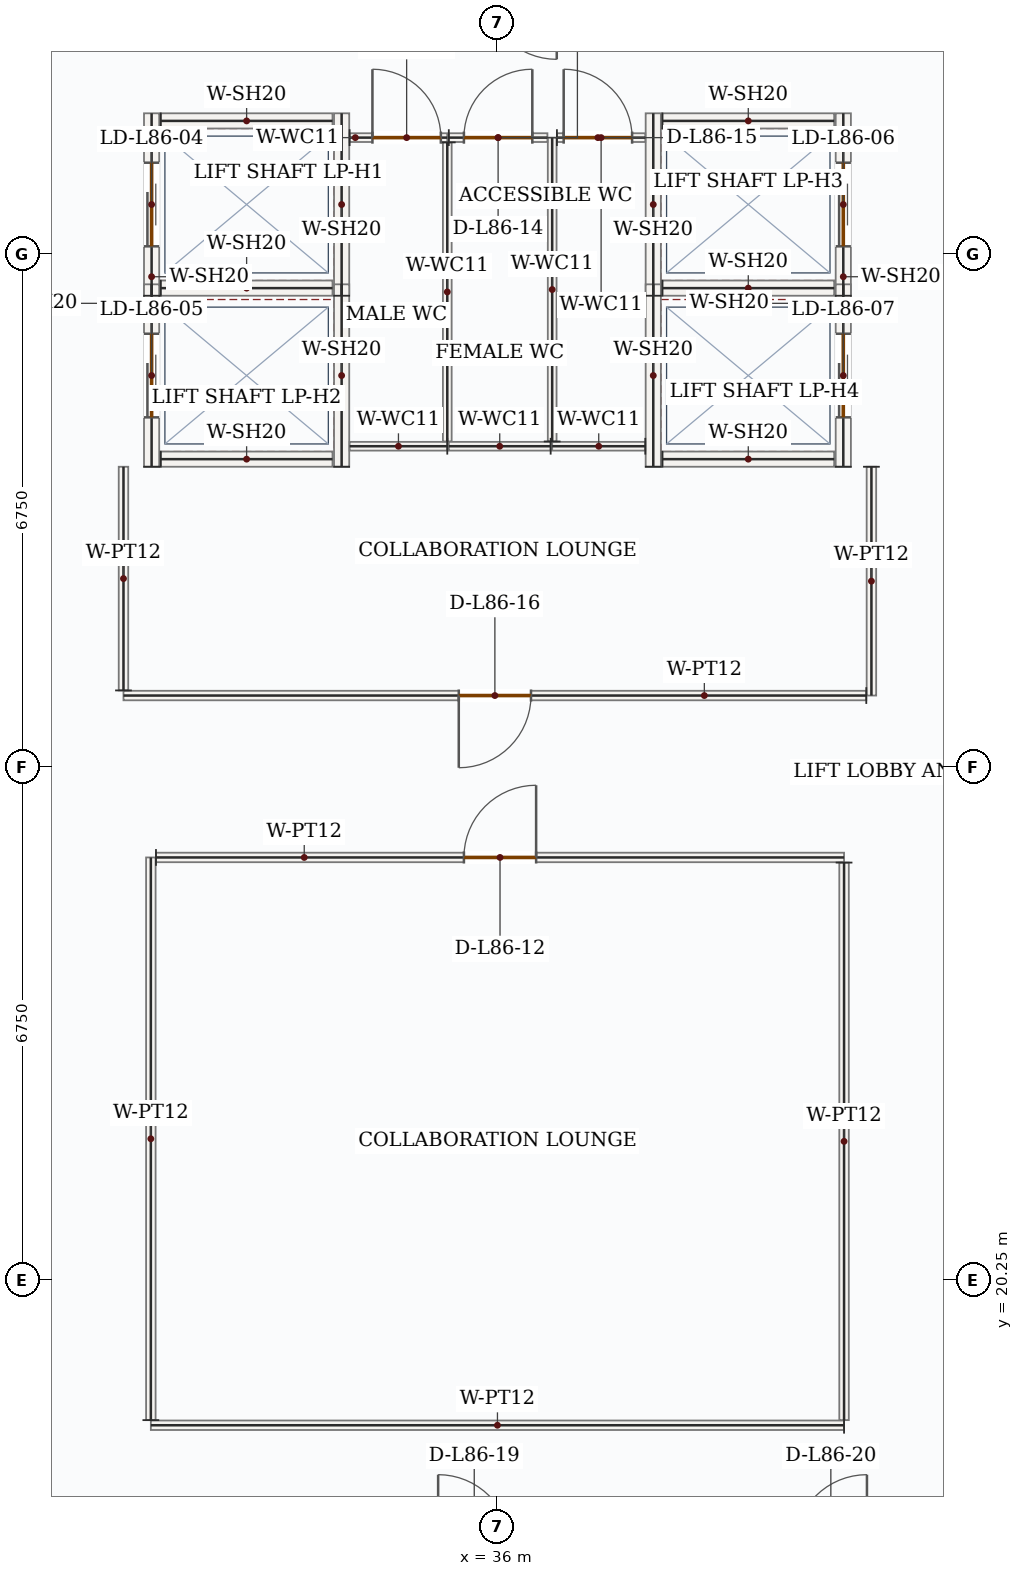
"""IFC4 building model, lengths in metres.
Left out: names, types, materials, properties, quantities, classifications, styles, units other than length and angle.
Written with IfcOpenShell. Run it as: python <this file> out.ifc"""

import sys

from ifc_helpers import new_model, si_unit, direction, frame, frame_2d, origin, place, context, subcontext, project, spatial, rectangle, extrude, source, transform, mapped, element, fill, save


model = new_model("IFC4")
c1 = context("Model", 3, precision=1e-05, world=origin(), true_north=direction((0.0, 1.0)))
c2 = subcontext(c1, "Body", "Model", "MODEL_VIEW")
j1 = project(units=[si_unit("LENGTHUNIT", "METRE"), si_unit("PLANEANGLEUNIT", "RADIAN")], contexts=[c1])
p1 = place(None, origin())
s1 = spatial("IfcSite", under=j1, at=p1, CompositionType="ELEMENT")
p2 = place(p1, origin())
s2 = spatial("IfcBuilding", under=s1, at=p2, CompositionType="ELEMENT")
p3 = place(p2, frame((0.0, 0.0, 353.55)))
s3 = spatial("IfcBuildingStorey", under=s2, at=p3, CompositionType="ELEMENT", Elevation=353.55)
p4 = place(p3, frame((31.45, 33.2, 0.0), z_axis=(0.0, 0.0, 1.0), x_axis=(0.0, 1.0, 0.0)))
e1 = element("IfcWall", 1, at=p4, inside=s3, PredefinedType="SOLIDWALL", context=c2, shape_type="SweptSolid", body=[
    extrude(rectangle(XDim=2.4, YDim=0.2, at=frame_2d((1.2, 0.0))), origin(), (0.0, 0.0, 1.0), 3.5),
])
p5 = place(p4, frame((0.65, 0.0, 0.0)))
e2 = element("IfcOpeningElement", 2, at=p5, cuts=e1, PredefinedType="OPENING", context=c2, shape_type="SweptSolid", body=[
    extrude(rectangle(XDim=1.1, YDim=2.15, at=frame_2d((0.55, 1.075))), frame((0.0, 0.11, 0.0), z_axis=(0.0, -1.0, 0.0), x_axis=(1.0, 0.0, 0.0)), (0.0, 0.0, 1.0), 0.22),
])
m1 = source(origin(), c2, "Body", "SweptSolid", [
    extrude(rectangle(XDim=2.4, YDim=0.2, at=frame_2d((1.2, 0.0))), origin(), (0.0, 0.0, 1.0), 3.5),
])
p6 = place(p3, frame((33.95, 33.2, 0.0), z_axis=(0.0, 0.0, 1.0), x_axis=(0.0, 1.0, 0.0)))
e3 = element("IfcWall", 3, at=p6, inside=s3, PredefinedType="SOLIDWALL", context=c2, shape_type="MappedRepresentation", body=[
    mapped(m1, transform((0.0, 0.0, 0.0), x_axis=(1.0, 0.0, 0.0), y_axis=(0.0, 1.0, 0.0), z_axis=(0.0, 0.0, 1.0), scale=1.0)),
])
m2 = source(origin(), c2, "Body", "SweptSolid", [
    extrude(rectangle(XDim=2.26, YDim=0.2, at=frame_2d((1.13, 0.0))), origin(), (0.0, 0.0, 1.0), 3.5),
])
for number, where, z_axis, x_axis in (
    (4, (31.57, 33.3, 0.0), (0.0, 0.0, 1.0), (1.0, 0.0, 0.0)),
    (5, (31.57, 35.5, 0.0), (0.0, 0.0, 1.0), (1.0, 0.0, 0.0)),
):
    element("IfcWall", number, at=place(p3, frame(where, z_axis=z_axis, x_axis=x_axis)), inside=s3, PredefinedType="SOLIDWALL", context=c2, shape_type="MappedRepresentation", body=[
        mapped(m2, transform((0.0, 0.0, 0.0), x_axis=(1.0, 0.0, 0.0), y_axis=(0.0, 1.0, 0.0), z_axis=(0.0, 0.0, 1.0), scale=1.0)),
    ])
p7 = place(p3, frame((31.45, 30.95, 0.0), z_axis=(0.0, 0.0, 1.0), x_axis=(0.0, 1.0, 0.0)))
e6 = element("IfcWall", 6, at=p7, inside=s3, PredefinedType="SOLIDWALL", context=c2, shape_type="SweptSolid", body=[
    extrude(rectangle(XDim=2.4, YDim=0.2, at=frame_2d((1.2, 0.0))), origin(), (0.0, 0.0, 1.0), 3.5),
])
p8 = place(p7, frame((0.65, 0.0, 0.0)))
e7 = element("IfcOpeningElement", 7, at=p8, cuts=e6, PredefinedType="OPENING", context=c2, shape_type="SweptSolid", body=[
    extrude(rectangle(XDim=1.1, YDim=2.15, at=frame_2d((0.55, 1.075))), frame((0.0, 0.11, 0.0), z_axis=(0.0, -1.0, 0.0), x_axis=(1.0, 0.0, 0.0)), (0.0, 0.0, 1.0), 0.22),
])
p9 = place(p3, frame((33.95, 30.95, 0.0), z_axis=(0.0, 0.0, 1.0), x_axis=(0.0, 1.0, 0.0)))
e8 = element("IfcWall", 8, at=p9, inside=s3, PredefinedType="SOLIDWALL", context=c2, shape_type="MappedRepresentation", body=[
    mapped(m1, transform((0.0, 0.0, 0.0), x_axis=(1.0, 0.0, 0.0), y_axis=(0.0, 1.0, 0.0), z_axis=(0.0, 0.0, 1.0), scale=1.0)),
])
p10 = place(p3, frame((31.57, 31.05, 0.0), z_axis=(0.0, 0.0, 1.0), x_axis=(1.0, 0.0, 0.0)))
e9 = element("IfcWall", 9, at=p10, inside=s3, PredefinedType="SOLIDWALL", context=c2, shape_type="MappedRepresentation", body=[
    mapped(m2, transform((0.0, 0.0, 0.0), x_axis=(1.0, 0.0, 0.0), y_axis=(0.0, 1.0, 0.0), z_axis=(0.0, 0.0, 1.0), scale=1.0)),
])
p11 = place(p3, frame((38.05, 33.2, 0.0), z_axis=(0.0, 0.0, 1.0), x_axis=(0.0, 1.0, 0.0)))
e10 = element("IfcWall", 10, at=p11, inside=s3, PredefinedType="SOLIDWALL", context=c2, shape_type="MappedRepresentation", body=[
    mapped(m1, transform((0.0, 0.0, 0.0), x_axis=(1.0, 0.0, 0.0), y_axis=(0.0, 1.0, 0.0), z_axis=(0.0, 0.0, 1.0), scale=1.0)),
])
p12 = place(p3, frame((40.55, 33.2, 0.0), z_axis=(0.0, 0.0, 1.0), x_axis=(0.0, 1.0, 0.0)))
e11 = element("IfcWall", 11, at=p12, inside=s3, PredefinedType="SOLIDWALL", context=c2, shape_type="SweptSolid", body=[
    extrude(rectangle(XDim=2.4, YDim=0.2, at=frame_2d((1.2, 0.0))), origin(), (0.0, 0.0, 1.0), 3.5),
])
p13 = place(p12, frame((0.65, 0.0, 0.0)))
e12 = element("IfcOpeningElement", 12, at=p13, cuts=e11, PredefinedType="OPENING", context=c2, shape_type="SweptSolid", body=[
    extrude(rectangle(XDim=1.1, YDim=2.15, at=frame_2d((0.55, 1.075))), frame((0.0, 0.11, 0.0), z_axis=(0.0, -1.0, 0.0), x_axis=(1.0, 0.0, 0.0)), (0.0, 0.0, 1.0), 0.22),
])
for number, where, z_axis, x_axis in (
    (13, (38.17, 33.3, 0.0), (0.0, 0.0, 1.0), (1.0, 0.0, 0.0)),
    (14, (38.17, 35.5, 0.0), (0.0, 0.0, 1.0), (1.0, 0.0, 0.0)),
):
    element("IfcWall", number, at=place(p3, frame(where, z_axis=z_axis, x_axis=x_axis)), inside=s3, PredefinedType="SOLIDWALL", context=c2, shape_type="MappedRepresentation", body=[
        mapped(m2, transform((0.0, 0.0, 0.0), x_axis=(1.0, 0.0, 0.0), y_axis=(0.0, 1.0, 0.0), z_axis=(0.0, 0.0, 1.0), scale=1.0)),
    ])
p14 = place(p3, frame((38.05, 30.95, 0.0), z_axis=(0.0, 0.0, 1.0), x_axis=(0.0, 1.0, 0.0)))
e15 = element("IfcWall", 15, at=p14, inside=s3, PredefinedType="SOLIDWALL", context=c2, shape_type="MappedRepresentation", body=[
    mapped(m1, transform((0.0, 0.0, 0.0), x_axis=(1.0, 0.0, 0.0), y_axis=(0.0, 1.0, 0.0), z_axis=(0.0, 0.0, 1.0), scale=1.0)),
])
p15 = place(p3, frame((40.55, 30.95, 0.0), z_axis=(0.0, 0.0, 1.0), x_axis=(0.0, 1.0, 0.0)))
e16 = element("IfcWall", 16, at=p15, inside=s3, PredefinedType="SOLIDWALL", context=c2, shape_type="SweptSolid", body=[
    extrude(rectangle(XDim=2.4, YDim=0.2, at=frame_2d((1.2, 0.0))), origin(), (0.0, 0.0, 1.0), 3.5),
])
p16 = place(p15, frame((0.65, 0.0, 0.0)))
e17 = element("IfcOpeningElement", 17, at=p16, cuts=e16, PredefinedType="OPENING", context=c2, shape_type="SweptSolid", body=[
    extrude(rectangle(XDim=1.1, YDim=2.15, at=frame_2d((0.55, 1.075))), frame((0.0, 0.11, 0.0), z_axis=(0.0, -1.0, 0.0), x_axis=(1.0, 0.0, 0.0)), (0.0, 0.0, 1.0), 0.22),
])
p17 = place(p3, frame((38.17, 31.05, 0.0), z_axis=(0.0, 0.0, 1.0), x_axis=(1.0, 0.0, 0.0)))
e18 = element("IfcWall", 18, at=p17, inside=s3, PredefinedType="SOLIDWALL", context=c2, shape_type="MappedRepresentation", body=[
    mapped(m2, transform((0.0, 0.0, 0.0), x_axis=(1.0, 0.0, 0.0), y_axis=(0.0, 1.0, 0.0), z_axis=(0.0, 0.0, 1.0), scale=1.0)),
])
m3 = source(origin(), c2, "Body", "SweptSolid", [
    extrude(rectangle(XDim=1.225, YDim=0.115, at=frame_2d((0.613, 0.0))), origin(), (0.0, 0.0, 1.0), 3.5),
])
p18 = place(p3, frame((37.945, 31.22, 0.0), z_axis=(0.0, 0.0, 1.0), x_axis=(-1.0, 0.0, 0.0)))
e19 = element("IfcWall", 19, at=p18, inside=s3, PredefinedType="PARTITIONING", context=c2, shape_type="MappedRepresentation", body=[
    mapped(m3, transform((0.0, 0.0, 0.0), x_axis=(1.0, 0.0, 0.0), y_axis=(0.0, 1.0, 0.0), z_axis=(0.0, 0.0, 1.0), scale=1.0)),
])
m4 = source(origin(), c2, "Body", "SweptSolid", [
    extrude(rectangle(XDim=3.998, YDim=0.115, at=frame_2d((1.999, 0.0))), origin(), (0.0, 0.0, 1.0), 3.5),
])
p19 = place(p3, frame((36.72, 31.282, 0.0), z_axis=(0.0, 0.0, 1.0), x_axis=(0.0, 1.0, 0.0)))
e20 = element("IfcWall", 20, at=p19, inside=s3, PredefinedType="PARTITIONING", context=c2, shape_type="MappedRepresentation", body=[
    mapped(m4, transform((0.0, 0.0, 0.0), x_axis=(1.0, 0.0, 0.0), y_axis=(0.0, 1.0, 0.0), z_axis=(0.0, 0.0, 1.0), scale=1.0)),
])
p20 = place(p3, frame((36.782, 35.28, 0.0), z_axis=(0.0, 0.0, 1.0), x_axis=(1.0, 0.0, 0.0)))
e21 = element("IfcWall", 21, at=p20, inside=s3, PredefinedType="PARTITIONING", context=c2, shape_type="SweptSolid", body=[
    extrude(rectangle(XDim=1.163, YDim=0.115, at=frame_2d((0.581, 0.0))), origin(), (0.0, 0.0, 1.0), 3.5),
])
p21 = place(p20, frame((0.089, 0.0, 0.0)))
e22 = element("IfcOpeningElement", 22, at=p21, cuts=e21, PredefinedType="OPENING", context=c2, shape_type="SweptSolid", body=[
    extrude(rectangle(XDim=0.9, YDim=2.1, at=frame_2d((0.45, 1.05))), frame((0.0, 0.067, 0.0), z_axis=(0.0, -1.0, 0.0), x_axis=(1.0, 0.0, 0.0)), (0.0, 0.0, 1.0), 0.135),
])
m5 = source(origin(), c2, "Body", "SweptSolid", [
    extrude(rectangle(XDim=1.285, YDim=0.115, at=frame_2d((0.643, 0.0))), origin(), (0.0, 0.0, 1.0), 3.5),
])
p22 = place(p3, frame((35.34, 31.22, 0.0), z_axis=(0.0, 0.0, 1.0), x_axis=(-1.0, 0.0, 0.0)))
e23 = element("IfcWall", 23, at=p22, inside=s3, PredefinedType="PARTITIONING", context=c2, shape_type="MappedRepresentation", body=[
    mapped(m5, transform((0.0, 0.0, 0.0), x_axis=(1.0, 0.0, 0.0), y_axis=(0.0, 1.0, 0.0), z_axis=(0.0, 0.0, 1.0), scale=1.0)),
])
p23 = place(p3, frame((34.055, 35.28, 0.0), z_axis=(0.0, 0.0, 1.0), x_axis=(1.0, 0.0, 0.0)))
e24 = element("IfcWall", 24, at=p23, inside=s3, PredefinedType="PARTITIONING", context=c2, shape_type="SweptSolid", body=[
    extrude(rectangle(XDim=1.285, YDim=0.115, at=frame_2d((0.643, 0.0))), origin(), (0.0, 0.0, 1.0), 3.5),
])
p24 = place(p23, frame((0.3, 0.0, 0.0)))
e25 = element("IfcOpeningElement", 25, at=p24, cuts=e24, PredefinedType="OPENING", context=c2, shape_type="SweptSolid", body=[
    extrude(rectangle(XDim=0.9, YDim=2.1, at=frame_2d((0.45, 1.05))), frame((0.0, 0.067, 0.0), z_axis=(0.0, -1.0, 0.0), x_axis=(1.0, 0.0, 0.0)), (0.0, 0.0, 1.0), 0.135),
])
m6 = source(origin(), c2, "Body", "SweptSolid", [
    extrude(rectangle(XDim=3.935, YDim=0.115, at=frame_2d((1.968, 0.0))), origin(), (0.0, 0.0, 1.0), 3.5),
])
p25 = place(p3, frame((35.34, 35.218, 0.0), z_axis=(0.0, 0.0, 1.0), x_axis=(0.0, -1.0, 0.0)))
e26 = element("IfcWall", 26, at=p25, inside=s3, PredefinedType="PARTITIONING", context=c2, shape_type="MappedRepresentation", body=[
    mapped(m6, transform((0.0, 0.0, 0.0), x_axis=(1.0, 0.0, 0.0), y_axis=(0.0, 1.0, 0.0), z_axis=(0.0, 0.0, 1.0), scale=1.0)),
])
m7 = source(origin(), c2, "Body", "SweptSolid", [
    extrude(rectangle(XDim=1.34, YDim=0.115, at=frame_2d((0.67, 0.0))), origin(), (0.0, 0.0, 1.0), 3.5),
])
p26 = place(p3, frame((36.7, 31.22, 0.0), z_axis=(0.0, 0.0, 1.0), x_axis=(-1.0, 0.0, 0.0)))
e27 = element("IfcWall", 27, at=p26, inside=s3, PredefinedType="PARTITIONING", context=c2, shape_type="MappedRepresentation", body=[
    mapped(m7, transform((0.0, 0.0, 0.0), x_axis=(1.0, 0.0, 0.0), y_axis=(0.0, 1.0, 0.0), z_axis=(0.0, 0.0, 1.0), scale=1.0)),
])
p27 = place(p3, frame((35.36, 35.28, 0.0), z_axis=(0.0, 0.0, 1.0), x_axis=(1.0, 0.0, 0.0)))
e28 = element("IfcWall", 28, at=p27, inside=s3, PredefinedType="PARTITIONING", context=c2, shape_type="SweptSolid", body=[
    extrude(rectangle(XDim=1.297, YDim=0.115, at=frame_2d((0.649, 0.0))), origin(), (0.0, 0.0, 1.0), 3.5),
])
p28 = place(p27, frame((0.199, 0.0, 0.0)))
e29 = element("IfcOpeningElement", 29, at=p28, cuts=e28, PredefinedType="OPENING", context=c2, shape_type="SweptSolid", body=[
    extrude(rectangle(XDim=0.9, YDim=2.1, at=frame_2d((0.45, 1.05))), frame((0.0, 0.067, 0.0), z_axis=(0.0, -1.0, 0.0), x_axis=(1.0, 0.0, 0.0)), (0.0, 0.0, 1.0), 0.135),
])
m8 = source(origin(), c2, "Body", "SweptSolid", [
    extrude(rectangle(XDim=3.01, YDim=0.125, at=frame_2d((1.505, 0.0))), origin(), (0.0, 0.0, 1.0), 3.5),
])
p29 = place(p3, frame((40.92, 30.95, 0.0), z_axis=(0.0, 0.0, 1.0), x_axis=(0.0, -1.0, 0.0)))
e30 = element("IfcWall", 30, at=p29, inside=s3, PredefinedType="PARTITIONING", context=c2, shape_type="MappedRepresentation", body=[
    mapped(m8, transform((0.0, 0.0, 0.0), x_axis=(1.0, 0.0, 0.0), y_axis=(0.0, 1.0, 0.0), z_axis=(0.0, 0.0, 1.0), scale=1.0)),
])
p30 = place(p3, frame((40.853, 27.94, 0.0), z_axis=(0.0, 0.0, 1.0), x_axis=(-1.0, 0.0, 0.0)))
e31 = element("IfcWall", 31, at=p30, inside=s3, PredefinedType="PARTITIONING", context=c2, shape_type="SweptSolid", body=[
    extrude(rectangle(XDim=9.772, YDim=0.125, at=frame_2d((4.886, 0.0))), origin(), (0.0, 0.0, 1.0), 3.5),
])
p31 = place(p30, frame((4.411, 0.0, 0.0)))
e32 = element("IfcOpeningElement", 32, at=p31, cuts=e31, PredefinedType="OPENING", context=c2, shape_type="SweptSolid", body=[
    extrude(rectangle(XDim=0.95, YDim=2.15, at=frame_2d((0.475, 1.075))), frame((0.0, 0.073, 0.0), z_axis=(0.0, -1.0, 0.0), x_axis=(1.0, 0.0, 0.0)), (0.0, 0.0, 1.0), 0.145),
])
m9 = source(origin(), c2, "Body", "SweptSolid", [
    extrude(rectangle(XDim=2.942, YDim=0.125, at=frame_2d((1.471, 0.0))), origin(), (0.0, 0.0, 1.0), 3.5),
])
p32 = place(p3, frame((31.08, 28.008, 0.0), z_axis=(0.0, 0.0, 1.0), x_axis=(0.0, 1.0, 0.0)))
e33 = element("IfcWall", 33, at=p32, inside=s3, PredefinedType="PARTITIONING", context=c2, shape_type="MappedRepresentation", body=[
    mapped(m9, transform((0.0, 0.0, 0.0), x_axis=(1.0, 0.0, 0.0), y_axis=(0.0, 1.0, 0.0), z_axis=(0.0, 0.0, 1.0), scale=1.0)),
])
m10 = source(origin(), c2, "Body", "SweptSolid", [
    extrude(rectangle(XDim=9.12, YDim=0.125, at=frame_2d((4.56, 0.0))), origin(), (0.0, 0.0, 1.0), 3.5),
])
p33 = place(p3, frame((40.56, 18.34, 0.0), z_axis=(0.0, 0.0, 1.0), x_axis=(-1.0, 0.0, 0.0)))
e34 = element("IfcWall", 34, at=p33, inside=s3, PredefinedType="PARTITIONING", context=c2, shape_type="MappedRepresentation", body=[
    mapped(m10, transform((0.0, 0.0, 0.0), x_axis=(1.0, 0.0, 0.0), y_axis=(0.0, 1.0, 0.0), z_axis=(0.0, 0.0, 1.0), scale=1.0)),
])
m11 = source(origin(), c2, "Body", "SweptSolid", [
    extrude(rectangle(XDim=7.403, YDim=0.125, at=frame_2d((3.701, 0.0))), origin(), (0.0, 0.0, 1.0), 3.5),
])
p34 = place(p3, frame((31.44, 18.407, 0.0), z_axis=(0.0, 0.0, 1.0), x_axis=(0.0, 1.0, 0.0)))
e35 = element("IfcWall", 35, at=p34, inside=s3, PredefinedType="PARTITIONING", context=c2, shape_type="MappedRepresentation", body=[
    mapped(m11, transform((0.0, 0.0, 0.0), x_axis=(1.0, 0.0, 0.0), y_axis=(0.0, 1.0, 0.0), z_axis=(0.0, 0.0, 1.0), scale=1.0)),
])
p35 = place(p3, frame((31.508, 25.81, 0.0), z_axis=(0.0, 0.0, 1.0), x_axis=(1.0, 0.0, 0.0)))
e36 = element("IfcWall", 36, at=p35, inside=s3, PredefinedType="PARTITIONING", context=c2, shape_type="SweptSolid", body=[
    extrude(rectangle(XDim=9.052, YDim=0.125, at=frame_2d((4.526, 0.0))), origin(), (0.0, 0.0, 1.0), 3.5),
])
p36 = place(p35, frame((4.051, 0.0, 0.0)))
e37 = element("IfcOpeningElement", 37, at=p36, cuts=e36, PredefinedType="OPENING", context=c2, shape_type="SweptSolid", body=[
    extrude(rectangle(XDim=0.95, YDim=2.15, at=frame_2d((0.475, 1.075))), frame((0.0, 0.073, 0.0), z_axis=(0.0, -1.0, 0.0), x_axis=(1.0, 0.0, 0.0)), (0.0, 0.0, 1.0), 0.145),
])
m12 = source(origin(), c2, "Body", "SweptSolid", [
    extrude(rectangle(XDim=7.335, YDim=0.125, at=frame_2d((3.667, 0.0))), origin(), (0.0, 0.0, 1.0), 3.5),
])
p37 = place(p3, frame((40.56, 25.742, 0.0), z_axis=(0.0, 0.0, 1.0), x_axis=(0.0, -1.0, 0.0)))
e38 = element("IfcWall", 38, at=p37, inside=s3, PredefinedType="PARTITIONING", context=c2, shape_type="MappedRepresentation", body=[
    mapped(m12, transform((0.0, 0.0, 0.0), x_axis=(1.0, 0.0, 0.0), y_axis=(0.0, 1.0, 0.0), z_axis=(0.0, 0.0, 1.0), scale=1.0)),
])
m13 = source(origin(), c2, "Body", "SweptSolid", [
    extrude(rectangle(XDim=1.1, YDim=2.15, at=frame_2d((0.55, 1.075))), frame((0.0, 0.025, 0.0), z_axis=(0.0, -1.0, 0.0), x_axis=(1.0, 0.0, 0.0)), (0.0, 0.0, 1.0), 0.05),
])
p38 = place(p5, origin())
e39 = element("IfcDoor", 39, at=p38, inside=s3, OperationType="DOUBLE_DOOR_SLIDING", PredefinedType="DOOR", context=c2, shape_type="MappedRepresentation", body=[
    mapped(m13, transform((0.0, 0.0, 0.0), x_axis=(1.0, 0.0, 0.0), y_axis=(0.0, 1.0, 0.0), z_axis=(0.0, 0.0, 1.0), scale=1.0)),
])
fill(e2, e39)
p39 = place(p8, origin())
e40 = element("IfcDoor", 40, at=p39, inside=s3, OperationType="DOUBLE_DOOR_SLIDING", PredefinedType="DOOR", context=c2, shape_type="MappedRepresentation", body=[
    mapped(m13, transform((0.0, 0.0, 0.0), x_axis=(1.0, 0.0, 0.0), y_axis=(0.0, 1.0, 0.0), z_axis=(0.0, 0.0, 1.0), scale=1.0)),
])
fill(e7, e40)
p40 = place(p13, origin())
e41 = element("IfcDoor", 41, at=p40, inside=s3, OperationType="DOUBLE_DOOR_SLIDING", PredefinedType="DOOR", context=c2, shape_type="MappedRepresentation", body=[
    mapped(m13, transform((0.0, 0.0, 0.0), x_axis=(1.0, 0.0, 0.0), y_axis=(0.0, 1.0, 0.0), z_axis=(0.0, 0.0, 1.0), scale=1.0)),
])
fill(e12, e41)
p41 = place(p16, origin())
e42 = element("IfcDoor", 42, at=p41, inside=s3, OperationType="DOUBLE_DOOR_SLIDING", PredefinedType="DOOR", context=c2, shape_type="MappedRepresentation", body=[
    mapped(m13, transform((0.0, 0.0, 0.0), x_axis=(1.0, 0.0, 0.0), y_axis=(0.0, 1.0, 0.0), z_axis=(0.0, 0.0, 1.0), scale=1.0)),
])
fill(e17, e42)
m14 = source(origin(), c2, "Body", "SweptSolid", [
    extrude(rectangle(XDim=0.95, YDim=2.15, at=frame_2d((0.475, 1.075))), frame((0.0, 0.025, 0.0), z_axis=(0.0, -1.0, 0.0), x_axis=(1.0, 0.0, 0.0)), (0.0, 0.0, 1.0), 0.05),
])
p42 = place(p36, origin())
e43 = element("IfcDoor", 43, at=p42, inside=s3, OperationType="SINGLE_SWING_RIGHT", PredefinedType="DOOR", context=c2, shape_type="MappedRepresentation", body=[
    mapped(m14, transform((0.0, 0.0, 0.0), x_axis=(1.0, 0.0, 0.0), y_axis=(0.0, 1.0, 0.0), z_axis=(0.0, 0.0, 1.0), scale=1.0)),
])
fill(e37, e43)
m15 = source(origin(), c2, "Body", "SweptSolid", [
    extrude(rectangle(XDim=0.9, YDim=2.1, at=frame_2d((0.45, 1.05))), frame((0.0, 0.025, 0.0), z_axis=(0.0, -1.0, 0.0), x_axis=(1.0, 0.0, 0.0)), (0.0, 0.0, 1.0), 0.05),
])
p43 = place(p24, origin())
e44 = element("IfcDoor", 44, at=p43, inside=s3, OperationType="SINGLE_SWING_LEFT", PredefinedType="DOOR", context=c2, shape_type="MappedRepresentation", body=[
    mapped(m15, transform((0.0, 0.0, 0.0), x_axis=(1.0, 0.0, 0.0), y_axis=(0.0, 1.0, 0.0), z_axis=(0.0, 0.0, 1.0), scale=1.0)),
])
fill(e25, e44)
p44 = place(p28, origin())
e45 = element("IfcDoor", 45, at=p44, inside=s3, OperationType="SINGLE_SWING_RIGHT", PredefinedType="DOOR", context=c2, shape_type="MappedRepresentation", body=[
    mapped(m15, transform((0.0, 0.0, 0.0), x_axis=(1.0, 0.0, 0.0), y_axis=(0.0, 1.0, 0.0), z_axis=(0.0, 0.0, 1.0), scale=1.0)),
])
fill(e29, e45)
p45 = place(p21, origin())
e46 = element("IfcDoor", 46, at=p45, inside=s3, OperationType="SINGLE_SWING_LEFT", PredefinedType="DOOR", context=c2, shape_type="MappedRepresentation", body=[
    mapped(m15, transform((0.0, 0.0, 0.0), x_axis=(1.0, 0.0, 0.0), y_axis=(0.0, 1.0, 0.0), z_axis=(0.0, 0.0, 1.0), scale=1.0)),
])
fill(e22, e46)
p46 = place(p31, origin())
e47 = element("IfcDoor", 47, at=p46, inside=s3, OperationType="SINGLE_SWING_RIGHT", PredefinedType="DOOR", context=c2, shape_type="MappedRepresentation", body=[
    mapped(m14, transform((0.0, 0.0, 0.0), x_axis=(1.0, 0.0, 0.0), y_axis=(0.0, 1.0, 0.0), z_axis=(0.0, 0.0, 1.0), scale=1.0)),
])
fill(e32, e47)
save(model, sys.argv[1])
